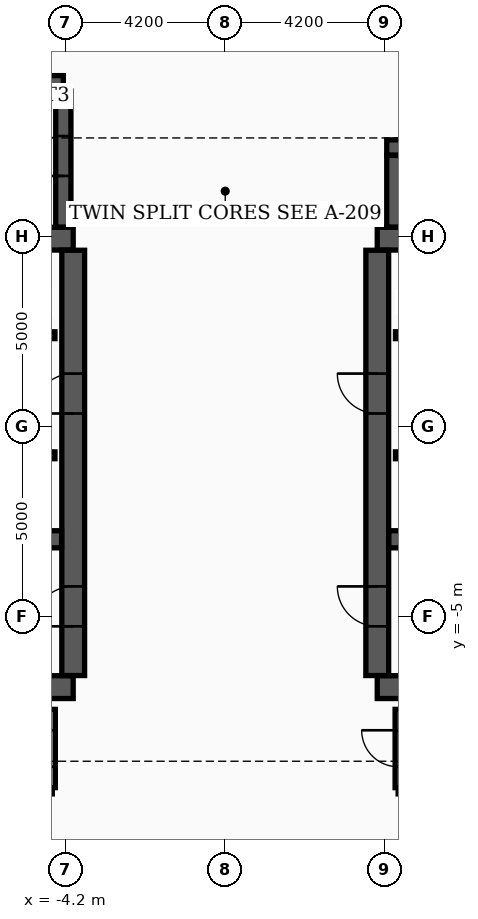
"""IFC4 building model, lengths in metres.
Left out: names, types, materials, properties, quantities, classifications, styles, units other than length and angle.
Written with IfcOpenShell. Run it as: python <this file> out.ifc"""

import sys

from ifc_helpers import new_model, si_unit, direction, frame, frame_2d, origin, place, context, subcontext, project, spatial, rectangle, extrude, element, fill, save


model = new_model("IFC4")
c1 = context("Model", 3, precision=1e-05, world=origin(), true_north=direction((0.0, 1.0)))
c2 = subcontext(c1, "Body", "Model", "MODEL_VIEW")
j1 = project(units=[si_unit("LENGTHUNIT", "METRE"), si_unit("PLANEANGLEUNIT", "RADIAN")], contexts=[c1])
p1 = place(None, origin())
s1 = spatial("IfcSite", under=j1, at=p1, CompositionType="ELEMENT")
p2 = place(p1, origin())
s2 = spatial("IfcBuilding", under=s1, at=p2, CompositionType="ELEMENT")
p3 = place(p2, frame((0.0, 0.0, 156.6)))
s3 = spatial("IfcBuildingStorey", under=s2, at=p3, CompositionType="ELEMENT", Elevation=156.6)
for number, where, z_axis, x_axis in (
    (1, (-12.4, -6.85, 0.0), (0.0, 0.0, 1.0), (1.0, 0.0, 0.0)),
    (2, (-12.4, 4.95, 0.0), (0.0, 0.0, 1.0), (1.0, 0.0, 0.0)),
):
    element("IfcWall", number, at=place(p3, frame(where, z_axis=z_axis, x_axis=x_axis)), inside=s3, PredefinedType="SHEAR", context=c2, shape_type="SweptSolid", body=[
        extrude(rectangle(XDim=8.4, YDim=0.6, at=frame_2d((4.2, 0.0))), origin(), (0.0, 0.0, 1.0), 3.7),
    ])
p4 = place(p3, frame((-4.0, -6.545, 0.0), z_axis=(0.0, 0.0, 1.0), x_axis=(0.0, 1.0, 0.0)))
e3 = element("IfcWall", 3, at=p4, inside=s3, PredefinedType="SHEAR", context=c2, shape_type="SweptSolid", body=[
    extrude(rectangle(XDim=11.19, YDim=0.6, at=frame_2d((5.595, 0.0))), origin(), (0.0, 0.0, 1.0), 3.7),
])
p5 = place(p4, frame((1.295, 0.0, 0.0)))
e4 = element("IfcOpeningElement", 4, at=p5, cuts=e3, PredefinedType="OPENING", context=c2, shape_type="SweptSolid", body=[
    extrude(rectangle(XDim=1.05, YDim=2.15, at=frame_2d((0.525, 1.075))), frame((0.0, 0.31, 0.0), z_axis=(0.0, -1.0, 0.0), x_axis=(1.0, 0.0, 0.0)), (0.0, 0.0, 1.0), 0.62),
])
p6 = place(p4, frame((6.895, 0.0, 0.0)))
e5 = element("IfcOpeningElement", 5, at=p6, cuts=e3, PredefinedType="OPENING", context=c2, shape_type="SweptSolid", body=[
    extrude(rectangle(XDim=1.05, YDim=2.15, at=frame_2d((0.525, 1.075))), frame((0.0, 0.31, 0.0), z_axis=(0.0, -1.0, 0.0), x_axis=(1.0, 0.0, 0.0)), (0.0, 0.0, 1.0), 0.62),
])
p7 = place(p3, frame((-12.095, -2.96, 0.0), z_axis=(0.0, 0.0, 1.0), x_axis=(1.0, 0.0, 0.0)))
e6 = element("IfcWall", 6, at=p7, inside=s3, PredefinedType="SHEAR", context=c2, shape_type="SweptSolid", body=[
    extrude(rectangle(XDim=7.79, YDim=0.45, at=frame_2d((3.895, 0.0))), origin(), (0.0, 0.0, 1.0), 3.7),
])
for number, where, z_axis, x_axis in (
    (7, (4.0, -6.85, 0.0), (0.0, 0.0, 1.0), (1.0, 0.0, 0.0)),
    (8, (4.0, 4.95, 0.0), (0.0, 0.0, 1.0), (1.0, 0.0, 0.0)),
):
    element("IfcWall", number, at=place(p3, frame(where, z_axis=z_axis, x_axis=x_axis)), inside=s3, PredefinedType="SHEAR", context=c2, shape_type="SweptSolid", body=[
        extrude(rectangle(XDim=8.4, YDim=0.6, at=frame_2d((4.2, 0.0))), origin(), (0.0, 0.0, 1.0), 3.7),
    ])
p8 = place(p3, frame((4.0, -6.545, 0.0), z_axis=(0.0, 0.0, 1.0), x_axis=(0.0, 1.0, 0.0)))
e9 = element("IfcWall", 9, at=p8, inside=s3, PredefinedType="SHEAR", context=c2, shape_type="SweptSolid", body=[
    extrude(rectangle(XDim=11.19, YDim=0.6, at=frame_2d((5.595, 0.0))), origin(), (0.0, 0.0, 1.0), 3.7),
])
p9 = place(p8, frame((1.295, 0.0, 0.0)))
e10 = element("IfcOpeningElement", 10, at=p9, cuts=e9, PredefinedType="OPENING", context=c2, shape_type="SweptSolid", body=[
    extrude(rectangle(XDim=1.05, YDim=2.15, at=frame_2d((0.525, 1.075))), frame((0.0, 0.31, 0.0), z_axis=(0.0, -1.0, 0.0), x_axis=(1.0, 0.0, 0.0)), (0.0, 0.0, 1.0), 0.62),
])
p10 = place(p8, frame((6.895, 0.0, 0.0)))
e11 = element("IfcOpeningElement", 11, at=p10, cuts=e9, PredefinedType="OPENING", context=c2, shape_type="SweptSolid", body=[
    extrude(rectangle(XDim=1.05, YDim=2.15, at=frame_2d((0.525, 1.075))), frame((0.0, 0.31, 0.0), z_axis=(0.0, -1.0, 0.0), x_axis=(1.0, 0.0, 0.0)), (0.0, 0.0, 1.0), 0.62),
])
p11 = place(p3, frame((4.305, -2.96, 0.0), z_axis=(0.0, 0.0, 1.0), x_axis=(1.0, 0.0, 0.0)))
e12 = element("IfcWall", 12, at=p11, inside=s3, PredefinedType="SHEAR", context=c2, shape_type="SweptSolid", body=[
    extrude(rectangle(XDim=7.79, YDim=0.45, at=frame_2d((3.895, 0.0))), origin(), (0.0, 0.0, 1.0), 3.7),
])
p12 = place(p3, frame((-12.22, 9.04, 0.0), z_axis=(0.0, 0.0, 1.0), x_axis=(1.0, 0.0, 0.0)))
e13 = element("IfcWall", 13, at=p12, inside=s3, PredefinedType="SHEAR", context=c2, shape_type="SweptSolid", body=[
    extrude(rectangle(XDim=7.96, YDim=0.4, at=frame_2d((3.98, 0.0))), origin(), (0.0, 0.0, 1.0), 3.7),
])
p13 = place(p3, frame((-4.26, 5.255, 0.0), z_axis=(0.0, 0.0, 1.0), x_axis=(0.0, 1.0, 0.0)))
e14 = element("IfcWall", 14, at=p13, inside=s3, PredefinedType="SHEAR", context=c2, shape_type="SweptSolid", body=[
    extrude(rectangle(XDim=3.58, YDim=0.4, at=frame_2d((1.79, 0.0))), origin(), (0.0, 0.0, 1.0), 3.7),
])
p14 = place(p13, frame((1.345, 0.0, 0.0)))
e15 = element("IfcOpeningElement", 15, at=p14, cuts=e14, PredefinedType="OPENING", context=c2, shape_type="SweptSolid", body=[
    extrude(rectangle(XDim=1.05, YDim=2.15, at=frame_2d((0.525, 1.075))), frame((0.0, 0.21, 0.0), z_axis=(0.0, -1.0, 0.0), x_axis=(1.0, 0.0, 0.0)), (0.0, 0.0, 1.0), 0.42),
])
p15 = place(p3, frame((4.45, 5.255, 0.0), z_axis=(0.0, 0.0, 1.0), x_axis=(0.0, 1.0, 0.0)))
e16 = element("IfcWall", 16, at=p15, inside=s3, PredefinedType="SHEAR", context=c2, shape_type="SweptSolid", body=[
    extrude(rectangle(XDim=1.885, YDim=0.4, at=frame_2d((0.942, 0.0))), origin(), (0.0, 0.0, 1.0), 3.7),
])
p16 = place(p3, frame((4.25, 7.35, 0.0), z_axis=(0.0, 0.0, 1.0), x_axis=(1.0, 0.0, 0.0)))
e17 = element("IfcWall", 17, at=p16, inside=s3, PredefinedType="SHEAR", context=c2, shape_type="SweptSolid", body=[
    extrude(rectangle(XDim=5.4, YDim=0.4, at=frame_2d((2.7, 0.0))), origin(), (0.0, 0.0, 1.0), 3.7),
])
p17 = place(p3, frame((-11.9, 2.41, 0.0), z_axis=(0.0, 0.0, 1.0), x_axis=(1.0, 0.0, 0.0)))
e18 = element("IfcWall", 18, at=p17, inside=s3, PredefinedType="SOLIDWALL", context=c2, shape_type="SweptSolid", body=[
    extrude(rectangle(XDim=7.42, YDim=0.18, at=frame_2d((3.71, 0.0))), origin(), (0.0, 0.0, 1.0), 2.96),
])
p18 = place(p17, frame((0.55, 0.0, 0.0)))
e19 = element("IfcOpeningElement", 19, at=p18, cuts=e18, PredefinedType="OPENING", context=c2, shape_type="SweptSolid", body=[
    extrude(rectangle(XDim=1.1, YDim=2.15, at=frame_2d((0.55, 1.075))), frame((0.0, 0.1, 0.0), z_axis=(0.0, -1.0, 0.0), x_axis=(1.0, 0.0, 0.0)), (0.0, 0.0, 1.0), 0.2),
])
p19 = place(p17, frame((4.9, 0.0, 0.0)))
e20 = element("IfcOpeningElement", 20, at=p19, cuts=e18, PredefinedType="OPENING", context=c2, shape_type="SweptSolid", body=[
    extrude(rectangle(XDim=0.88, YDim=2.1, at=frame_2d((0.44, 1.05))), frame((0.0, 0.1, 0.0), z_axis=(0.0, -1.0, 0.0), x_axis=(1.0, 0.0, 0.0)), (0.0, 0.0, 1.0), 0.2),
])
p20 = place(p3, frame((4.48, 2.41, 0.0), z_axis=(0.0, 0.0, 1.0), x_axis=(1.0, 0.0, 0.0)))
e21 = element("IfcWall", 21, at=p20, inside=s3, PredefinedType="SOLIDWALL", context=c2, shape_type="SweptSolid", body=[
    extrude(rectangle(XDim=7.42, YDim=0.18, at=frame_2d((3.71, 0.0))), origin(), (0.0, 0.0, 1.0), 2.96),
])
p21 = place(p20, frame((5.67, 0.0, 0.0)))
e22 = element("IfcOpeningElement", 22, at=p21, cuts=e21, PredefinedType="OPENING", context=c2, shape_type="SweptSolid", body=[
    extrude(rectangle(XDim=1.1, YDim=2.15, at=frame_2d((0.55, 1.075))), frame((0.0, 0.1, 0.0), z_axis=(0.0, -1.0, 0.0), x_axis=(1.0, 0.0, 0.0)), (0.0, 0.0, 1.0), 0.2),
])
p22 = place(p20, frame((1.6, 0.0, 0.0)))
e23 = element("IfcOpeningElement", 23, at=p22, cuts=e21, PredefinedType="OPENING", context=c2, shape_type="SweptSolid", body=[
    extrude(rectangle(XDim=0.88, YDim=2.1, at=frame_2d((0.44, 1.05))), frame((0.0, 0.1, 0.0), z_axis=(0.0, -1.0, 0.0), x_axis=(1.0, 0.0, 0.0)), (0.0, 0.0, 1.0), 0.2),
])
p23 = place(p3, frame((-11.9, -0.75, 0.0), z_axis=(0.0, 0.0, 1.0), x_axis=(1.0, 0.0, 0.0)))
e24 = element("IfcWall", 24, at=p23, inside=s3, PredefinedType="SOLIDWALL", context=c2, shape_type="SweptSolid", body=[
    extrude(rectangle(XDim=7.42, YDim=0.18, at=frame_2d((3.71, 0.0))), origin(), (0.0, 0.0, 1.0), 2.96),
])
p24 = place(p23, frame((0.45, 0.0, 0.0)))
e25 = element("IfcOpeningElement", 25, at=p24, cuts=e24, PredefinedType="OPENING", context=c2, shape_type="SweptSolid", body=[
    extrude(rectangle(XDim=1.1, YDim=2.15, at=frame_2d((0.55, 1.075))), frame((0.0, 0.1, 0.0), z_axis=(0.0, -1.0, 0.0), x_axis=(1.0, 0.0, 0.0)), (0.0, 0.0, 1.0), 0.2),
])
p25 = place(p23, frame((2.35, 0.0, 0.0)))
e26 = element("IfcOpeningElement", 26, at=p25, cuts=e24, PredefinedType="OPENING", context=c2, shape_type="SweptSolid", body=[
    extrude(rectangle(XDim=1.1, YDim=2.15, at=frame_2d((0.55, 1.075))), frame((0.0, 0.1, 0.0), z_axis=(0.0, -1.0, 0.0), x_axis=(1.0, 0.0, 0.0)), (0.0, 0.0, 1.0), 0.2),
])
p26 = place(p3, frame((4.48, -0.75, 0.0), z_axis=(0.0, 0.0, 1.0), x_axis=(1.0, 0.0, 0.0)))
e27 = element("IfcWall", 27, at=p26, inside=s3, PredefinedType="SOLIDWALL", context=c2, shape_type="SweptSolid", body=[
    extrude(rectangle(XDim=7.42, YDim=0.18, at=frame_2d((3.71, 0.0))), origin(), (0.0, 0.0, 1.0), 2.96),
])
p27 = place(p26, frame((0.52, 0.0, 0.0)))
e28 = element("IfcOpeningElement", 28, at=p27, cuts=e27, PredefinedType="OPENING", context=c2, shape_type="SweptSolid", body=[
    extrude(rectangle(XDim=1.1, YDim=2.15, at=frame_2d((0.55, 1.075))), frame((0.0, 0.1, 0.0), z_axis=(0.0, -1.0, 0.0), x_axis=(1.0, 0.0, 0.0)), (0.0, 0.0, 1.0), 0.2),
])
p28 = place(p3, frame((4.55, -9.58, 0.0), z_axis=(0.0, 0.0, 1.0), x_axis=(1.0, 0.0, 0.0)))
e29 = element("IfcWall", 29, at=p28, inside=s3, PredefinedType="PARTITIONING", context=c2, shape_type="SweptSolid", body=[
    extrude(rectangle(XDim=8.1, YDim=0.16, at=frame_2d((4.05, 0.0))), origin(), (0.0, 0.0, 1.0), 2.96),
])
p29 = place(p3, frame((4.55, -9.495, 0.0), z_axis=(0.0, 0.0, 1.0), x_axis=(0.0, 1.0, 0.0)))
e30 = element("IfcWall", 30, at=p29, inside=s3, PredefinedType="PARTITIONING", context=c2, shape_type="SweptSolid", body=[
    extrude(rectangle(XDim=2.06, YDim=0.16, at=frame_2d((1.03, 0.0))), origin(), (0.0, 0.0, 1.0), 2.96),
])
p30 = place(p29, frame((0.55, 0.0, 0.0)))
e31 = element("IfcOpeningElement", 31, at=p30, cuts=e30, PredefinedType="OPENING", context=c2, shape_type="SweptSolid", body=[
    extrude(rectangle(XDim=0.96, YDim=2.15, at=frame_2d((0.48, 1.075))), frame((0.0, 0.09, 0.0), z_axis=(0.0, -1.0, 0.0), x_axis=(1.0, 0.0, 0.0)), (0.0, 0.0, 1.0), 0.18),
])
p31 = place(p3, frame((-4.55, -9.495, 0.0), z_axis=(0.0, 0.0, 1.0), x_axis=(0.0, 1.0, 0.0)))
e32 = element("IfcWall", 32, at=p31, inside=s3, PredefinedType="PARTITIONING", context=c2, shape_type="SweptSolid", body=[
    extrude(rectangle(XDim=2.06, YDim=0.16, at=frame_2d((1.03, 0.0))), origin(), (0.0, 0.0, 1.0), 2.96),
])
p32 = place(p31, frame((0.55, 0.0, 0.0)))
e33 = element("IfcOpeningElement", 33, at=p32, cuts=e32, PredefinedType="OPENING", context=c2, shape_type="SweptSolid", body=[
    extrude(rectangle(XDim=0.96, YDim=2.15, at=frame_2d((0.48, 1.075))), frame((0.0, 0.09, 0.0), z_axis=(0.0, -1.0, 0.0), x_axis=(1.0, 0.0, 0.0)), (0.0, 0.0, 1.0), 0.18),
])
p33 = place(p5, origin())
e34 = element("IfcDoor", 34, at=p33, inside=s3, OperationType="SINGLE_SWING_LEFT", PredefinedType="DOOR", context=c2, shape_type="SweptSolid", body=[
    extrude(rectangle(XDim=1.05, YDim=2.15, at=frame_2d((0.525, 1.075))), frame((0.0, 0.025, 0.0), z_axis=(0.0, -1.0, 0.0), x_axis=(1.0, 0.0, 0.0)), (0.0, 0.0, 1.0), 0.05),
])
fill(e4, e34)
p34 = place(p9, origin())
e35 = element("IfcDoor", 35, at=p34, inside=s3, OperationType="SINGLE_SWING_RIGHT", PredefinedType="DOOR", context=c2, shape_type="SweptSolid", body=[
    extrude(rectangle(XDim=1.05, YDim=2.15, at=frame_2d((0.525, 1.075))), frame((0.0, 0.025, 0.0), z_axis=(0.0, -1.0, 0.0), x_axis=(1.0, 0.0, 0.0)), (0.0, 0.0, 1.0), 0.05),
])
fill(e10, e35)
p35 = place(p6, origin())
e36 = element("IfcDoor", 36, at=p35, inside=s3, OperationType="SINGLE_SWING_LEFT", PredefinedType="DOOR", context=c2, shape_type="SweptSolid", body=[
    extrude(rectangle(XDim=1.05, YDim=2.15, at=frame_2d((0.525, 1.075))), frame((0.0, 0.025, 0.0), z_axis=(0.0, -1.0, 0.0), x_axis=(1.0, 0.0, 0.0)), (0.0, 0.0, 1.0), 0.05),
])
fill(e5, e36)
p36 = place(p10, origin())
e37 = element("IfcDoor", 37, at=p36, inside=s3, OperationType="SINGLE_SWING_RIGHT", PredefinedType="DOOR", context=c2, shape_type="SweptSolid", body=[
    extrude(rectangle(XDim=1.05, YDim=2.15, at=frame_2d((0.525, 1.075))), frame((0.0, 0.025, 0.0), z_axis=(0.0, -1.0, 0.0), x_axis=(1.0, 0.0, 0.0)), (0.0, 0.0, 1.0), 0.05),
])
fill(e11, e37)
p37 = place(p14, origin())
e38 = element("IfcDoor", 38, at=p37, inside=s3, OperationType="SINGLE_SWING_LEFT", PredefinedType="DOOR", context=c2, shape_type="SweptSolid", body=[
    extrude(rectangle(XDim=1.05, YDim=2.15, at=frame_2d((0.525, 1.075))), frame((0.0, 0.025, 0.0), z_axis=(0.0, -1.0, 0.0), x_axis=(1.0, 0.0, 0.0)), (0.0, 0.0, 1.0), 0.05),
])
fill(e15, e38)
p38 = place(p30, origin())
e39 = element("IfcDoor", 39, at=p38, inside=s3, OperationType="SINGLE_SWING_RIGHT", PredefinedType="DOOR", context=c2, shape_type="SweptSolid", body=[
    extrude(rectangle(XDim=0.96, YDim=2.15, at=frame_2d((0.48, 1.075))), frame((0.0, 0.025, 0.0), z_axis=(0.0, -1.0, 0.0), x_axis=(1.0, 0.0, 0.0)), (0.0, 0.0, 1.0), 0.05),
])
fill(e31, e39)
p39 = place(p32, origin())
e40 = element("IfcDoor", 40, at=p39, inside=s3, OperationType="SINGLE_SWING_LEFT", PredefinedType="DOOR", context=c2, shape_type="SweptSolid", body=[
    extrude(rectangle(XDim=0.96, YDim=2.15, at=frame_2d((0.48, 1.075))), frame((0.0, 0.025, 0.0), z_axis=(0.0, -1.0, 0.0), x_axis=(1.0, 0.0, 0.0)), (0.0, 0.0, 1.0), 0.05),
])
fill(e33, e40)
save(model, sys.argv[1])
